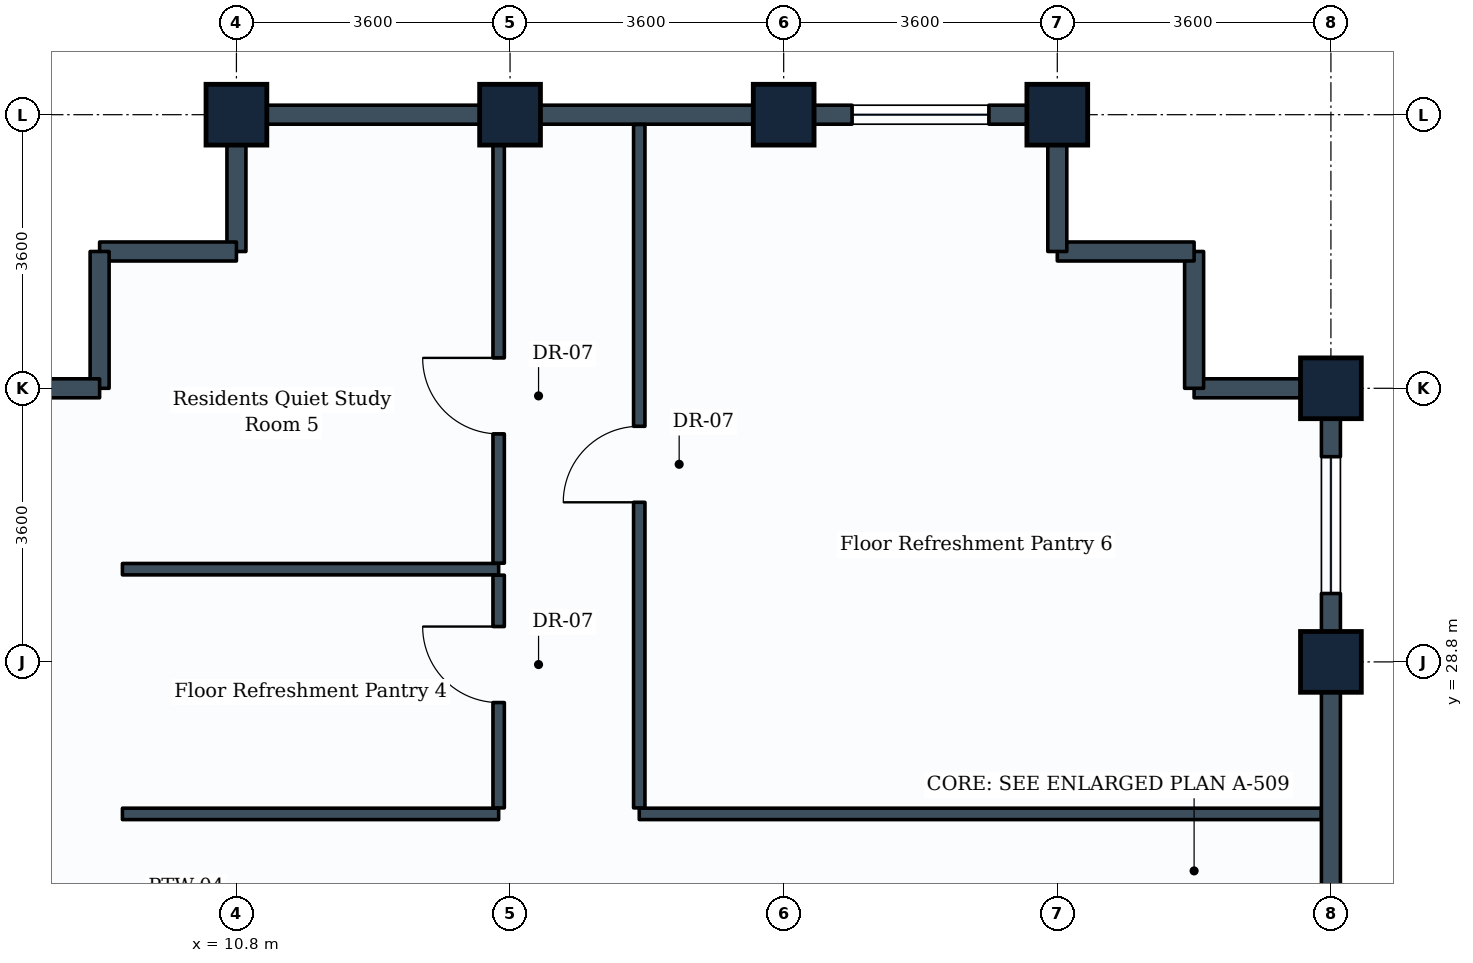
"""IFC4 building model, lengths in metres.
Left out: names, types, materials, properties, quantities, classifications, styles, units other than length and angle.
Written with IfcOpenShell. Run it as: python <this file> out.ifc"""

import sys

from ifc_helpers import new_model, si_unit, direction, frame, frame_2d, origin, origin_2d, place, context, subcontext, project, spatial, rectangle, extrude, element, fill, save


model = new_model("IFC4")
c1 = context("Model", 3, precision=1e-05, world=origin(), true_north=direction((0.0, 1.0)))
c2 = subcontext(c1, "Body", "Model", "MODEL_VIEW")
j1 = project(units=[si_unit("LENGTHUNIT", "METRE"), si_unit("PLANEANGLEUNIT", "RADIAN")], contexts=[c1])
p1 = place(None, origin())
s1 = spatial("IfcSite", under=j1, at=p1, CompositionType="ELEMENT")
p2 = place(p1, origin())
s2 = spatial("IfcBuilding", under=s1, at=p2, CompositionType="ELEMENT")
p3 = place(p2, frame((0.0, 0.0, 259.4)))
s3 = spatial("IfcBuildingStorey", under=s2, at=p3, CompositionType="ELEMENT", Elevation=259.4)
for number, where, z_axis, x_axis in (
    (1, (10.8, 36.0, 0.0), (0.0, 0.0, 1.0), (1.0, 0.0, 0.0)),
    (2, (14.4, 36.0, 0.0), (0.0, 0.0, 1.0), (1.0, 0.0, 0.0)),
    (3, (18.0, 36.0, 0.0), (0.0, 0.0, 1.0), (1.0, 0.0, 0.0)),
    (4, (21.6, 36.0, 0.0), (0.0, 0.0, 1.0), (1.0, 0.0, 0.0)),
    (5, (25.2, 28.8, 0.0), (0.0, 0.0, 1.0), (0.0, 1.0, 0.0)),
    (6, (25.2, 32.4, 0.0), (0.0, 0.0, 1.0), (0.0, 1.0, 0.0)),
):
    element("IfcColumn", number, at=place(p3, frame(where, z_axis=z_axis, x_axis=x_axis)), inside=s3, PredefinedType="COLUMN", context=c2, shape_type="SweptSolid", body=[
        extrude(rectangle(XDim=0.8, YDim=0.8, at=origin_2d()), origin(), (0.0, 0.0, 1.0), 3.6),
    ])
p4 = place(p3, frame((25.2, 28.8, 0.0), z_axis=(0.0, 0.0, 1.0), x_axis=(0.0, -1.0, 0.0)))
e7 = element("IfcWall", 7, at=p4, inside=s3, PredefinedType="STANDARD", context=c2, shape_type="SweptSolid", body=[
    extrude(rectangle(XDim=3.6, YDim=0.25, at=frame_2d((1.8, 0.0))), origin(), (0.0, 0.0, 1.0), 2.83),
])
p5 = place(p3, frame((25.2, 32.4, 0.0), z_axis=(0.0, 0.0, 1.0), x_axis=(0.0, -1.0, 0.0)))
e8 = element("IfcWall", 8, at=p5, inside=s3, PredefinedType="STANDARD", context=c2, shape_type="SweptSolid", body=[
    extrude(rectangle(XDim=3.6, YDim=0.25, at=frame_2d((1.8, 0.0))), origin(), (0.0, 0.0, 1.0), 2.83),
])
p6 = place(p5, frame((0.9, 0.0, 0.85)))
e9 = element("IfcOpeningElement", 9, at=p6, cuts=e8, PredefinedType="OPENING", context=c2, shape_type="SweptSolid", body=[
    extrude(rectangle(XDim=1.8, YDim=1.35, at=frame_2d((0.9, 0.675))), frame((0.0, 0.135, 0.0), z_axis=(0.0, -1.0, 0.0), x_axis=(1.0, 0.0, 0.0)), (0.0, 0.0, 1.0), 0.27),
])
p7 = place(p3, frame((23.4, 32.4, 0.0), z_axis=(0.0, 0.0, 1.0), x_axis=(1.0, 0.0, 0.0)))
e10 = element("IfcWall", 10, at=p7, inside=s3, PredefinedType="STANDARD", context=c2, shape_type="SweptSolid", body=[
    extrude(rectangle(XDim=1.8, YDim=0.25, at=frame_2d((0.9, 0.0))), origin(), (0.0, 0.0, 1.0), 2.83),
])
p8 = place(p3, frame((23.4, 32.4, 0.0), z_axis=(0.0, 0.0, 1.0), x_axis=(0.0, 1.0, 0.0)))
e11 = element("IfcWall", 11, at=p8, inside=s3, PredefinedType="STANDARD", context=c2, shape_type="SweptSolid", body=[
    extrude(rectangle(XDim=1.8, YDim=0.25, at=frame_2d((0.9, 0.0))), origin(), (0.0, 0.0, 1.0), 3.335),
])
p9 = place(p3, frame((21.6, 34.2, 0.0), z_axis=(0.0, 0.0, 1.0), x_axis=(1.0, 0.0, 0.0)))
e12 = element("IfcWall", 12, at=p9, inside=s3, PredefinedType="STANDARD", context=c2, shape_type="SweptSolid", body=[
    extrude(rectangle(XDim=1.8, YDim=0.25, at=frame_2d((0.9, 0.0))), origin(), (0.0, 0.0, 1.0), 3.335),
])
p10 = place(p3, frame((21.6, 34.2, 0.0), z_axis=(0.0, 0.0, 1.0), x_axis=(0.0, 1.0, 0.0)))
e13 = element("IfcWall", 13, at=p10, inside=s3, PredefinedType="STANDARD", context=c2, shape_type="SweptSolid", body=[
    extrude(rectangle(XDim=1.8, YDim=0.25, at=frame_2d((0.9, 0.0))), origin(), (0.0, 0.0, 1.0), 2.83),
])
p11 = place(p3, frame((18.0, 36.0, 0.0), z_axis=(0.0, 0.0, 1.0), x_axis=(1.0, 0.0, 0.0)))
e14 = element("IfcWall", 14, at=p11, inside=s3, PredefinedType="STANDARD", context=c2, shape_type="SweptSolid", body=[
    extrude(rectangle(XDim=3.6, YDim=0.25, at=frame_2d((1.8, 0.0))), origin(), (0.0, 0.0, 1.0), 2.83),
])
p12 = place(p11, frame((0.9, 0.0, 0.85)))
e15 = element("IfcOpeningElement", 15, at=p12, cuts=e14, PredefinedType="OPENING", context=c2, shape_type="SweptSolid", body=[
    extrude(rectangle(XDim=1.8, YDim=1.35, at=frame_2d((0.9, 0.675))), frame((0.0, 0.135, 0.0), z_axis=(0.0, -1.0, 0.0), x_axis=(1.0, 0.0, 0.0)), (0.0, 0.0, 1.0), 0.27),
])
p13 = place(p3, frame((14.4, 36.0, 0.0), z_axis=(0.0, 0.0, 1.0), x_axis=(1.0, 0.0, 0.0)))
e16 = element("IfcWall", 16, at=p13, inside=s3, PredefinedType="STANDARD", context=c2, shape_type="SweptSolid", body=[
    extrude(rectangle(XDim=3.6, YDim=0.25, at=frame_2d((1.8, 0.0))), origin(), (0.0, 0.0, 1.0), 2.83),
])
p14 = place(p3, frame((10.8, 36.0, 0.0), z_axis=(0.0, 0.0, 1.0), x_axis=(1.0, 0.0, 0.0)))
e17 = element("IfcWall", 17, at=p14, inside=s3, PredefinedType="STANDARD", context=c2, shape_type="SweptSolid", body=[
    extrude(rectangle(XDim=3.6, YDim=0.25, at=frame_2d((1.8, 0.0))), origin(), (0.0, 0.0, 1.0), 2.83),
])
p15 = place(p3, frame((10.8, 34.2, 0.0), z_axis=(0.0, 0.0, 1.0), x_axis=(0.0, 1.0, 0.0)))
e18 = element("IfcWall", 18, at=p15, inside=s3, PredefinedType="STANDARD", context=c2, shape_type="SweptSolid", body=[
    extrude(rectangle(XDim=1.8, YDim=0.25, at=frame_2d((0.9, 0.0))), origin(), (0.0, 0.0, 1.0), 2.83),
])
for number, where, z_axis, x_axis in (
    (19, (9.0, 34.2, 0.0), (0.0, 0.0, 1.0), (1.0, 0.0, 0.0)),
    (20, (9.0, 32.4, 0.0), (0.0, 0.0, 1.0), (0.0, 1.0, 0.0)),
):
    element("IfcWall", number, at=place(p3, frame(where, z_axis=z_axis, x_axis=x_axis)), inside=s3, PredefinedType="STANDARD", context=c2, shape_type="SweptSolid", body=[
        extrude(rectangle(XDim=1.8, YDim=0.25, at=frame_2d((0.9, 0.0))), origin(), (0.0, 0.0, 1.0), 3.335),
    ])
p16 = place(p3, frame((7.2, 32.4, 0.0), z_axis=(0.0, 0.0, 1.0), x_axis=(1.0, 0.0, 0.0)))
e21 = element("IfcWall", 21, at=p16, inside=s3, PredefinedType="STANDARD", context=c2, shape_type="SweptSolid", body=[
    extrude(rectangle(XDim=1.8, YDim=0.25, at=frame_2d((0.9, 0.0))), origin(), (0.0, 0.0, 1.0), 2.83),
])
for number, where, z_axis, x_axis in (
    (22, (9.3, 26.8, 0.0), (0.0, 0.0, 1.0), (1.0, 0.0, 0.0)),
    (23, (9.3, 30.02, 0.0), (0.0, 0.0, 1.0), (1.0, 0.0, 0.0)),
):
    element("IfcWall", number, at=place(p3, frame(where, z_axis=z_axis, x_axis=x_axis)), inside=s3, PredefinedType="PARTITIONING", context=c2, shape_type="SweptSolid", body=[
        extrude(rectangle(XDim=4.95, YDim=0.15, at=frame_2d((2.475, 0.0))), origin(), (0.0, 0.0, 1.0), 3.335),
    ])
p17 = place(p3, frame((14.25, 26.879, 0.0), z_axis=(0.0, 0.0, 1.0), x_axis=(0.0, 1.0, 0.0)))
e24 = element("IfcWall", 24, at=p17, inside=s3, PredefinedType="PARTITIONING", context=c2, shape_type="SweptSolid", body=[
    extrude(rectangle(XDim=3.062, YDim=0.15, at=frame_2d((1.531, 0.0))), origin(), (0.0, 0.0, 1.0), 3.03),
])
p18 = place(p17, frame((1.386, 0.0, 0.0)))
e25 = element("IfcOpeningElement", 25, at=p18, cuts=e24, PredefinedType="OPENING", context=c2, shape_type="SweptSolid", body=[
    extrude(rectangle(XDim=1.0, YDim=2.1, at=frame_2d((0.5, 1.05))), frame((0.0, 0.085, 0.0), z_axis=(0.0, -1.0, 0.0), x_axis=(1.0, 0.0, 0.0)), (0.0, 0.0, 1.0), 0.17),
])
p19 = place(p3, frame((14.25, 30.099, 0.0), z_axis=(0.0, 0.0, 1.0), x_axis=(0.0, 1.0, 0.0)))
e26 = element("IfcWall", 26, at=p19, inside=s3, PredefinedType="PARTITIONING", context=c2, shape_type="SweptSolid", body=[
    extrude(rectangle(XDim=5.772, YDim=0.15, at=frame_2d((2.886, 0.0))), origin(), (0.0, 0.0, 1.0), 2.83),
])
p20 = place(p19, frame((1.701, 0.0, 0.0)))
e27 = element("IfcOpeningElement", 27, at=p20, cuts=e26, PredefinedType="OPENING", context=c2, shape_type="SweptSolid", body=[
    extrude(rectangle(XDim=1.0, YDim=2.1, at=frame_2d((0.5, 1.05))), frame((0.0, 0.085, 0.0), z_axis=(0.0, -1.0, 0.0), x_axis=(1.0, 0.0, 0.0)), (0.0, 0.0, 1.0), 0.17),
])
p21 = place(p3, frame((16.1, 26.8, 0.0), z_axis=(0.0, 0.0, 1.0), x_axis=(1.0, 0.0, 0.0)))
e28 = element("IfcWall", 28, at=p21, inside=s3, PredefinedType="PARTITIONING", context=c2, shape_type="SweptSolid", body=[
    extrude(rectangle(XDim=8.971, YDim=0.15, at=frame_2d((4.485, 0.0))), origin(), (0.0, 0.0, 1.0), 2.83),
])
p22 = place(p3, frame((16.1, 26.879, 0.0), z_axis=(0.0, 0.0, 1.0), x_axis=(0.0, 1.0, 0.0)))
e29 = element("IfcWall", 29, at=p22, inside=s3, PredefinedType="PARTITIONING", context=c2, shape_type="SweptSolid", body=[
    extrude(rectangle(XDim=8.992, YDim=0.15, at=frame_2d((4.496, 0.0))), origin(), (0.0, 0.0, 1.0), 2.83),
])
p23 = place(p22, frame((4.021, 0.0, 0.0)))
e30 = element("IfcOpeningElement", 30, at=p23, cuts=e29, PredefinedType="OPENING", context=c2, shape_type="SweptSolid", body=[
    extrude(rectangle(XDim=1.0, YDim=2.1, at=frame_2d((0.5, 1.05))), frame((0.0, 0.085, 0.0), z_axis=(0.0, -1.0, 0.0), x_axis=(1.0, 0.0, 0.0)), (0.0, 0.0, 1.0), 0.17),
])
p24 = place(p6, origin())
e31 = element("IfcWindow", 31, at=p24, inside=s3, PartitioningType="SINGLE_PANEL", PredefinedType="WINDOW", context=c2, shape_type="SweptSolid", body=[
    extrude(rectangle(XDim=1.8, YDim=1.35, at=frame_2d((0.9, 0.675))), frame((0.0, 0.03, 0.0), z_axis=(0.0, -1.0, 0.0), x_axis=(1.0, 0.0, 0.0)), (0.0, 0.0, 1.0), 0.06),
])
fill(e9, e31)
p25 = place(p12, origin())
e32 = element("IfcWindow", 32, at=p25, inside=s3, PartitioningType="SINGLE_PANEL", PredefinedType="WINDOW", context=c2, shape_type="SweptSolid", body=[
    extrude(rectangle(XDim=1.8, YDim=1.35, at=frame_2d((0.9, 0.675))), frame((0.0, 0.03, 0.0), z_axis=(0.0, -1.0, 0.0), x_axis=(1.0, 0.0, 0.0)), (0.0, 0.0, 1.0), 0.06),
])
fill(e15, e32)
p26 = place(p18, origin())
e33 = element("IfcDoor", 33, at=p26, inside=s3, OperationType="SINGLE_SWING_RIGHT", PredefinedType="DOOR", context=c2, shape_type="SweptSolid", body=[
    extrude(rectangle(XDim=1.0, YDim=2.1, at=frame_2d((0.5, 1.05))), frame((0.0, 0.025, 0.0), z_axis=(0.0, -1.0, 0.0), x_axis=(1.0, 0.0, 0.0)), (0.0, 0.0, 1.0), 0.05),
])
fill(e25, e33)
p27 = place(p20, origin())
e34 = element("IfcDoor", 34, at=p27, inside=s3, OperationType="SINGLE_SWING_RIGHT", PredefinedType="DOOR", context=c2, shape_type="SweptSolid", body=[
    extrude(rectangle(XDim=1.0, YDim=2.1, at=frame_2d((0.5, 1.05))), frame((0.0, 0.025, 0.0), z_axis=(0.0, -1.0, 0.0), x_axis=(1.0, 0.0, 0.0)), (0.0, 0.0, 1.0), 0.05),
])
fill(e27, e34)
p28 = place(p23, origin())
e35 = element("IfcDoor", 35, at=p28, inside=s3, OperationType="SINGLE_SWING_LEFT", PredefinedType="DOOR", context=c2, shape_type="SweptSolid", body=[
    extrude(rectangle(XDim=1.0, YDim=2.1, at=frame_2d((0.5, 1.05))), frame((0.0, 0.025, 0.0), z_axis=(0.0, -1.0, 0.0), x_axis=(1.0, 0.0, 0.0)), (0.0, 0.0, 1.0), 0.05),
])
fill(e30, e35)
save(model, sys.argv[1])
